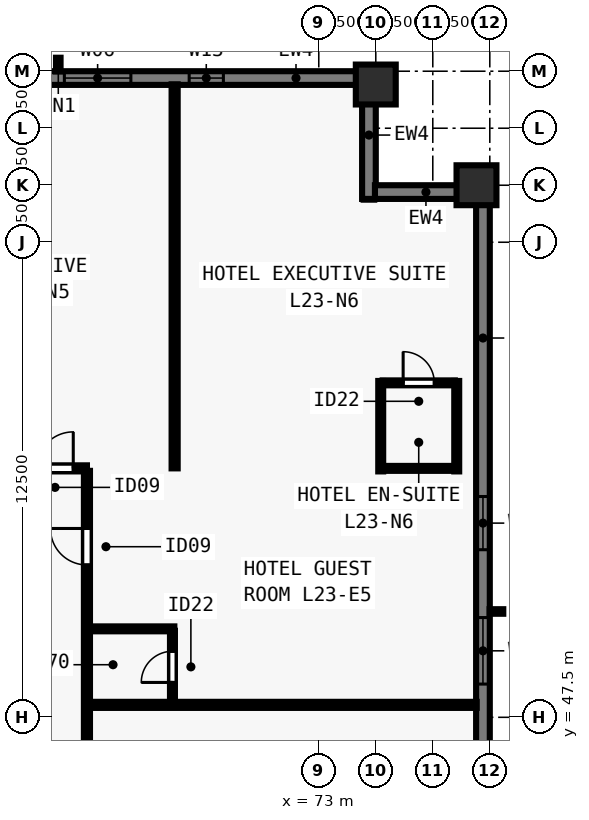
"""IFC4 building model, lengths in metres.
Left out: names, types, materials, properties, quantities, classifications, styles, units other than length and angle.
Written with IfcOpenShell. Run it as: python <this file> out.ifc"""

import sys

from ifc_helpers import new_model, si_unit, direction, frame, frame_2d, origin, origin_2d, place, context, subcontext, project, spatial, rectangle, extrude, element, fill, save


model = new_model("IFC4")
c1 = context("Model", 3, precision=1e-05, world=origin(), true_north=direction((0.0, 1.0)))
c2 = subcontext(c1, "Body", "Model", "MODEL_VIEW")
j1 = project(units=[si_unit("LENGTHUNIT", "METRE"), si_unit("PLANEANGLEUNIT", "RADIAN")], contexts=[c1])
p1 = place(None, origin())
s1 = spatial("IfcSite", under=j1, at=p1, CompositionType="ELEMENT")
p2 = place(p1, origin())
s2 = spatial("IfcBuilding", under=s1, at=p2, CompositionType="ELEMENT")
p3 = place(p2, frame((0.0, 0.0, 86.5)))
s3 = spatial("IfcBuildingStorey", under=s2, at=p3, CompositionType="ELEMENT", Elevation=86.5)
for number, where, z_axis, x_axis in (
    (1, (77.15, 61.5, 0.0), (0.0, 0.0, 1.0), (0.0, 1.0, 0.0)),
    (2, (74.5, 64.15, 0.0), (0.0, 0.0, 1.0), (1.0, 0.0, 0.0)),
):
    element("IfcColumn", number, at=place(p3, frame(where, z_axis=z_axis, x_axis=x_axis)), inside=s3, PredefinedType="COLUMN", context=c2, shape_type="SweptSolid", body=[
        extrude(rectangle(XDim=1.05, YDim=1.05, at=origin_2d()), origin(), (0.0, 0.0, 1.0), 3.5),
    ])
p4 = place(p3, frame((62.8, 64.32, 0.0), z_axis=(0.0, 0.0, 1.0), x_axis=(1.0, 0.0, 0.0)))
e3 = element("IfcWall", 3, at=p4, inside=s3, PredefinedType="SOLIDWALL", context=c2, shape_type="SweptSolid", body=[
    extrude(rectangle(XDim=11.362, YDim=0.36, at=frame_2d((5.681, 0.0))), origin(), (0.0, 0.0, 1.0), 3.28),
])
p5 = place(p4, frame((3.506, 0.0, 0.8)))
e4 = element("IfcOpeningElement", 4, at=p5, cuts=e3, PredefinedType="OPENING", context=c2, shape_type="SweptSolid", body=[
    extrude(rectangle(XDim=1.75, YDim=1.544, at=frame_2d((0.875, 0.772))), frame((0.0, 0.19, 0.0), z_axis=(0.0, -1.0, 0.0), x_axis=(1.0, 0.0, 0.0)), (0.0, 0.0, 1.0), 0.38),
])
p6 = place(p4, frame((6.79, 0.0, 0.8)))
e5 = element("IfcOpeningElement", 5, at=p6, cuts=e3, PredefinedType="OPENING", context=c2, shape_type="SweptSolid", body=[
    extrude(rectangle(XDim=0.9, YDim=1.544, at=frame_2d((0.45, 0.772))), frame((0.0, 0.19, 0.0), z_axis=(0.0, -1.0, 0.0), x_axis=(1.0, 0.0, 0.0)), (0.0, 0.0, 1.0), 0.38),
])
p7 = place(p3, frame((74.32, 64.5, 0.0), z_axis=(0.0, 0.0, 1.0), x_axis=(0.0, -1.0, 0.0)))
e6 = element("IfcWall", 6, at=p7, inside=s3, PredefinedType="SOLIDWALL", context=c2, shape_type="SweptSolid", body=[
    extrude(rectangle(XDim=3.36, YDim=0.36, at=frame_2d((1.68, 0.0))), origin(), (0.0, 0.0, 1.0), 3.28),
])
p8 = place(p3, frame((74.478, 61.32, 0.0), z_axis=(0.0, 0.0, 1.0), x_axis=(1.0, 0.0, 0.0)))
e7 = element("IfcWall", 7, at=p8, inside=s3, PredefinedType="SOLIDWALL", context=c2, shape_type="SweptSolid", body=[
    extrude(rectangle(XDim=2.684, YDim=0.36, at=frame_2d((1.342, 0.0))), origin(), (0.0, 0.0, 1.0), 3.28),
])
p9 = place(p3, frame((77.32, 61.5, 0.0), z_axis=(0.0, 0.0, 1.0), x_axis=(0.0, -1.0, 0.0)))
e8 = element("IfcWall", 8, at=p9, inside=s3, PredefinedType="SOLIDWALL", context=c2, shape_type="SweptSolid", body=[
    extrude(rectangle(XDim=44.662, YDim=0.36, at=frame_2d((22.331, 0.0))), origin(), (0.0, 0.0, 1.0), 3.28),
])
p10 = place(p9, frame((8.19, 0.0, 0.8)))
e9 = element("IfcOpeningElement", 9, at=p10, cuts=e8, PredefinedType="OPENING", context=c2, shape_type="SweptSolid", body=[
    extrude(rectangle(XDim=1.4, YDim=1.544, at=frame_2d((0.7, 0.772))), frame((0.0, 0.19, 0.0), z_axis=(0.0, -1.0, 0.0), x_axis=(1.0, 0.0, 0.0)), (0.0, 0.0, 1.0), 0.38),
])
p11 = place(p9, frame((11.375, 0.0, 0.8)))
e10 = element("IfcOpeningElement", 10, at=p11, cuts=e8, PredefinedType="OPENING", context=c2, shape_type="SweptSolid", body=[
    extrude(rectangle(XDim=1.75, YDim=1.544, at=frame_2d((0.875, 0.772))), frame((0.0, 0.19, 0.0), z_axis=(0.0, -1.0, 0.0), x_axis=(1.0, 0.0, 0.0)), (0.0, 0.0, 1.0), 0.38),
])
p12 = place(p9, frame((14.911, 0.0, 0.8)))
e11 = element("IfcOpeningElement", 11, at=p12, cuts=e8, PredefinedType="OPENING", context=c2, shape_type="SweptSolid", body=[
    extrude(rectangle(XDim=1.4, YDim=1.544, at=frame_2d((0.7, 0.772))), frame((0.0, 0.19, 0.0), z_axis=(0.0, -1.0, 0.0), x_axis=(1.0, 0.0, 0.0)), (0.0, 0.0, 1.0), 0.38),
])
p13 = place(p9, frame((21.631, 0.0, 0.8)))
e12 = element("IfcOpeningElement", 12, at=p13, cuts=e8, PredefinedType="OPENING", context=c2, shape_type="SweptSolid", body=[
    extrude(rectangle(XDim=1.4, YDim=1.544, at=frame_2d((0.7, 0.772))), frame((0.0, 0.19, 0.0), z_axis=(0.0, -1.0, 0.0), x_axis=(1.0, 0.0, 0.0)), (0.0, 0.0, 1.0), 0.38),
])
p14 = place(p9, frame((23.566, 0.0, 0.8)))
e13 = element("IfcOpeningElement", 13, at=p14, cuts=e8, PredefinedType="OPENING", context=c2, shape_type="SweptSolid", body=[
    extrude(rectangle(XDim=1.75, YDim=1.544, at=frame_2d((0.875, 0.772))), frame((0.0, 0.19, 0.0), z_axis=(0.0, -1.0, 0.0), x_axis=(1.0, 0.0, 0.0)), (0.0, 0.0, 1.0), 0.38),
])
p15 = place(p9, frame((28.351, 0.0, 0.8)))
e14 = element("IfcOpeningElement", 14, at=p15, cuts=e8, PredefinedType="OPENING", context=c2, shape_type="SweptSolid", body=[
    extrude(rectangle(XDim=1.4, YDim=1.544, at=frame_2d((0.7, 0.772))), frame((0.0, 0.19, 0.0), z_axis=(0.0, -1.0, 0.0), x_axis=(1.0, 0.0, 0.0)), (0.0, 0.0, 1.0), 0.38),
])
p16 = place(p9, frame((31.987, 0.0, 0.8)))
e15 = element("IfcOpeningElement", 15, at=p16, cuts=e8, PredefinedType="OPENING", context=c2, shape_type="SweptSolid", body=[
    extrude(rectangle(XDim=1.75, YDim=1.544, at=frame_2d((0.875, 0.772))), frame((0.0, 0.19, 0.0), z_axis=(0.0, -1.0, 0.0), x_axis=(1.0, 0.0, 0.0)), (0.0, 0.0, 1.0), 0.38),
])
p17 = place(p9, frame((35.072, 0.0, 0.8)))
e16 = element("IfcOpeningElement", 16, at=p17, cuts=e8, PredefinedType="OPENING", context=c2, shape_type="SweptSolid", body=[
    extrude(rectangle(XDim=1.4, YDim=1.544, at=frame_2d((0.7, 0.772))), frame((0.0, 0.19, 0.0), z_axis=(0.0, -1.0, 0.0), x_axis=(1.0, 0.0, 0.0)), (0.0, 0.0, 1.0), 0.38),
])
p18 = place(p9, frame((38.257, 0.0, 0.8)))
e17 = element("IfcOpeningElement", 17, at=p18, cuts=e8, PredefinedType="OPENING", context=c2, shape_type="SweptSolid", body=[
    extrude(rectangle(XDim=1.75, YDim=1.544, at=frame_2d((0.875, 0.772))), frame((0.0, 0.19, 0.0), z_axis=(0.0, -1.0, 0.0), x_axis=(1.0, 0.0, 0.0)), (0.0, 0.0, 1.0), 0.38),
])
p19 = place(p3, frame((37.1, 54.05, 0.0), z_axis=(0.0, 0.0, 1.0), x_axis=(1.0, 0.0, 0.0)))
e18 = element("IfcWall", 18, at=p19, inside=s3, PredefinedType="PARTITIONING", context=c2, shape_type="SweptSolid", body=[
    extrude(rectangle(XDim=29.8, YDim=0.16, at=frame_2d((14.9, 0.0))), origin(), (0.0, 0.0, 1.0), 3.28),
])
p20 = place(p19, frame((0.91, 0.0, 0.0)))
e19 = element("IfcOpeningElement", 19, at=p20, cuts=e18, PredefinedType="OPENING", context=c2, shape_type="SweptSolid", body=[
    extrude(rectangle(XDim=0.96, YDim=2.15, at=frame_2d((0.48, 1.075))), frame((0.0, 0.09, 0.0), z_axis=(0.0, -1.0, 0.0), x_axis=(1.0, 0.0, 0.0)), (0.0, 0.0, 1.0), 0.18),
])
p21 = place(p19, frame((3.03, 0.0, 0.0)))
e20 = element("IfcOpeningElement", 20, at=p21, cuts=e18, PredefinedType="OPENING", context=c2, shape_type="SweptSolid", body=[
    extrude(rectangle(XDim=0.96, YDim=2.15, at=frame_2d((0.48, 1.075))), frame((0.0, 0.09, 0.0), z_axis=(0.0, -1.0, 0.0), x_axis=(1.0, 0.0, 0.0)), (0.0, 0.0, 1.0), 0.18),
])
p22 = place(p19, frame((11.39, 0.0, 0.0)))
e21 = element("IfcOpeningElement", 21, at=p22, cuts=e18, PredefinedType="OPENING", context=c2, shape_type="SweptSolid", body=[
    extrude(rectangle(XDim=0.96, YDim=2.15, at=frame_2d((0.48, 1.075))), frame((0.0, 0.09, 0.0), z_axis=(0.0, -1.0, 0.0), x_axis=(1.0, 0.0, 0.0)), (0.0, 0.0, 1.0), 0.18),
])
p23 = place(p19, frame((19.75, 0.0, 0.0)))
e22 = element("IfcOpeningElement", 22, at=p23, cuts=e18, PredefinedType="OPENING", context=c2, shape_type="SweptSolid", body=[
    extrude(rectangle(XDim=0.96, YDim=2.15, at=frame_2d((0.48, 1.075))), frame((0.0, 0.09, 0.0), z_axis=(0.0, -1.0, 0.0), x_axis=(1.0, 0.0, 0.0)), (0.0, 0.0, 1.0), 0.18),
])
p24 = place(p19, frame((26.931, 0.0, 0.0)))
e23 = element("IfcOpeningElement", 23, at=p24, cuts=e18, PredefinedType="OPENING", context=c2, shape_type="SweptSolid", body=[
    extrude(rectangle(XDim=0.96, YDim=2.15, at=frame_2d((0.48, 1.075))), frame((0.0, 0.09, 0.0), z_axis=(0.0, -1.0, 0.0), x_axis=(1.0, 0.0, 0.0)), (0.0, 0.0, 1.0), 0.18),
])
p25 = place(p19, frame((28.48, 0.0, 0.0)))
e24 = element("IfcOpeningElement", 24, at=p25, cuts=e18, PredefinedType="OPENING", context=c2, shape_type="SweptSolid", body=[
    extrude(rectangle(XDim=0.96, YDim=2.15, at=frame_2d((0.48, 1.075))), frame((0.0, 0.09, 0.0), z_axis=(0.0, -1.0, 0.0), x_axis=(1.0, 0.0, 0.0)), (0.0, 0.0, 1.0), 0.18),
])
p26 = place(p3, frame((66.9, 24.015, 0.0), z_axis=(0.0, 0.0, 1.0), x_axis=(0.0, 1.0, 0.0)))
e25 = element("IfcWall", 25, at=p26, inside=s3, PredefinedType="PARTITIONING", context=c2, shape_type="SweptSolid", body=[
    extrude(rectangle(XDim=29.97, YDim=0.16, at=frame_2d((14.985, 0.0))), origin(), (0.0, 0.0, 1.0), 3.28),
])
p27 = place(p26, frame((3.911, 0.0, 0.0)))
e26 = element("IfcOpeningElement", 26, at=p27, cuts=e25, PredefinedType="OPENING", context=c2, shape_type="SweptSolid", body=[
    extrude(rectangle(XDim=0.96, YDim=2.15, at=frame_2d((0.48, 1.075))), frame((0.0, 0.09, 0.0), z_axis=(0.0, -1.0, 0.0), x_axis=(1.0, 0.0, 0.0)), (0.0, 0.0, 1.0), 0.18),
])
p28 = place(p26, frame((9.544, 0.0, 0.0)))
e27 = element("IfcOpeningElement", 27, at=p28, cuts=e25, PredefinedType="OPENING", context=c2, shape_type="SweptSolid", body=[
    extrude(rectangle(XDim=0.96, YDim=2.15, at=frame_2d((0.48, 1.075))), frame((0.0, 0.09, 0.0), z_axis=(0.0, -1.0, 0.0), x_axis=(1.0, 0.0, 0.0)), (0.0, 0.0, 1.0), 0.18),
])
p29 = place(p26, frame((15.625, 0.0, 0.0)))
e28 = element("IfcOpeningElement", 28, at=p29, cuts=e25, PredefinedType="OPENING", context=c2, shape_type="SweptSolid", body=[
    extrude(rectangle(XDim=0.96, YDim=2.15, at=frame_2d((0.48, 1.075))), frame((0.0, 0.09, 0.0), z_axis=(0.0, -1.0, 0.0), x_axis=(1.0, 0.0, 0.0)), (0.0, 0.0, 1.0), 0.18),
])
p30 = place(p26, frame((21.584, 0.0, 0.0)))
e29 = element("IfcOpeningElement", 29, at=p30, cuts=e25, PredefinedType="OPENING", context=c2, shape_type="SweptSolid", body=[
    extrude(rectangle(XDim=0.96, YDim=2.15, at=frame_2d((0.48, 1.075))), frame((0.0, 0.09, 0.0), z_axis=(0.0, -1.0, 0.0), x_axis=(1.0, 0.0, 0.0)), (0.0, 0.0, 1.0), 0.18),
])
p31 = place(p26, frame((27.494, 0.0, 0.0)))
e30 = element("IfcOpeningElement", 30, at=p31, cuts=e25, PredefinedType="OPENING", context=c2, shape_type="SweptSolid", body=[
    extrude(rectangle(XDim=0.96, YDim=2.15, at=frame_2d((0.48, 1.075))), frame((0.0, 0.09, 0.0), z_axis=(0.0, -1.0, 0.0), x_axis=(1.0, 0.0, 0.0)), (0.0, 0.0, 1.0), 0.18),
])
p32 = place(p3, frame((69.208, 54.05, 0.0), z_axis=(0.0, 0.0, 1.0), x_axis=(0.0, 1.0, 0.0)))
e31 = element("IfcWall", 31, at=p32, inside=s3, PredefinedType="PARTITIONING", context=c2, shape_type="SweptSolid", body=[
    extrude(rectangle(XDim=10.105, YDim=0.16, at=frame_2d((5.052, 0.0))), origin(), (0.0, 0.0, 1.0), 2.439),
])
for number, where, z_axis, x_axis in (
    (32, (76.63, 53.97, 0.0), (0.0, 0.0, 1.0), (0.0, 1.0, 0.0)),
    (33, (74.63, 53.97, 0.0), (0.0, 0.0, 1.0), (0.0, 1.0, 0.0)),
):
    element("IfcWall", number, at=place(p3, frame(where, z_axis=z_axis, x_axis=x_axis)), inside=s3, PredefinedType="PLUMBINGWALL", context=c2, shape_type="SweptSolid", body=[
        extrude(rectangle(XDim=2.38, YDim=0.13, at=frame_2d((1.19, 0.0))), origin(), (0.0, 0.0, 1.0), 3.28),
    ])
p33 = place(p3, frame((74.68, 56.3, 0.0), z_axis=(0.0, 0.0, 1.0), x_axis=(1.0, 0.0, 0.0)))
e34 = element("IfcWall", 34, at=p33, inside=s3, PredefinedType="PLUMBINGWALL", context=c2, shape_type="SweptSolid", body=[
    extrude(rectangle(XDim=1.9, YDim=0.13, at=frame_2d((0.95, 0.0))), origin(), (0.0, 0.0, 1.0), 3.28),
])
p34 = place(p33, frame((0.54, 0.0, 0.0)))
e35 = element("IfcOpeningElement", 35, at=p34, cuts=e34, PredefinedType="OPENING", context=c2, shape_type="SweptSolid", body=[
    extrude(rectangle(XDim=0.82, YDim=2.1, at=frame_2d((0.41, 1.05))), frame((0.0, 0.075, 0.0), z_axis=(0.0, -1.0, 0.0), x_axis=(1.0, 0.0, 0.0)), (0.0, 0.0, 1.0), 0.15),
])
p35 = place(p3, frame((74.68, 54.05, 0.0), z_axis=(0.0, 0.0, 1.0), x_axis=(1.0, 0.0, 0.0)))
e36 = element("IfcWall", 36, at=p35, inside=s3, PredefinedType="PLUMBINGWALL", context=c2, shape_type="SweptSolid", body=[
    extrude(rectangle(XDim=1.9, YDim=0.13, at=frame_2d((0.95, 0.0))), origin(), (0.0, 0.0, 1.0), 3.28),
])
p36 = place(p3, frame((66.965, 47.827, 0.0), z_axis=(0.0, 0.0, 1.0), x_axis=(1.0, 0.0, 0.0)))
e37 = element("IfcWall", 37, at=p36, inside=s3, PredefinedType="PARTITIONING", context=c2, shape_type="SweptSolid", body=[
    extrude(rectangle(XDim=10.19, YDim=0.16, at=frame_2d((5.095, 0.0))), origin(), (0.0, 0.0, 1.0), 3.28),
])
p37 = place(p3, frame((66.965, 49.827, 0.0), z_axis=(0.0, 0.0, 1.0), x_axis=(1.0, 0.0, 0.0)))
e38 = element("IfcWall", 38, at=p37, inside=s3, PredefinedType="PLUMBINGWALL", context=c2, shape_type="SweptSolid", body=[
    extrude(rectangle(XDim=2.235, YDim=0.13, at=frame_2d((1.117, 0.0))), origin(), (0.0, 0.0, 1.0), 3.28),
])
p38 = place(p3, frame((69.15, 47.893, 0.0), z_axis=(0.0, 0.0, 1.0), x_axis=(0.0, 1.0, 0.0)))
e39 = element("IfcWall", 39, at=p38, inside=s3, PredefinedType="PLUMBINGWALL", context=c2, shape_type="SweptSolid", body=[
    extrude(rectangle(XDim=1.885, YDim=0.13, at=frame_2d((0.942, 0.0))), origin(), (0.0, 0.0, 1.0), 3.28),
])
p39 = place(p38, frame((0.525, 0.0, 0.0)))
e40 = element("IfcOpeningElement", 40, at=p39, cuts=e39, PredefinedType="OPENING", context=c2, shape_type="SweptSolid", body=[
    extrude(rectangle(XDim=0.82, YDim=2.1, at=frame_2d((0.41, 1.05))), frame((0.0, 0.075, 0.0), z_axis=(0.0, -1.0, 0.0), x_axis=(1.0, 0.0, 0.0)), (0.0, 0.0, 1.0), 0.15),
])
p40 = place(p5, origin())
e41 = element("IfcWindow", 41, at=p40, inside=s3, PartitioningType="SINGLE_PANEL", PredefinedType="WINDOW", context=c2, shape_type="SweptSolid", body=[
    extrude(rectangle(XDim=1.75, YDim=1.544, at=frame_2d((0.875, 0.772))), frame((0.0, -0.05, 0.0), z_axis=(0.0, -1.0, 0.0), x_axis=(1.0, 0.0, 0.0)), (0.0, 0.0, 1.0), 0.06),
])
fill(e4, e41)
p41 = place(p10, origin())
e42 = element("IfcWindow", 42, at=p41, inside=s3, PartitioningType="SINGLE_PANEL", PredefinedType="WINDOW", context=c2, shape_type="SweptSolid", body=[
    extrude(rectangle(XDim=1.4, YDim=1.544, at=frame_2d((0.7, 0.772))), frame((0.0, -0.05, 0.0), z_axis=(0.0, -1.0, 0.0), x_axis=(1.0, 0.0, 0.0)), (0.0, 0.0, 1.0), 0.06),
])
fill(e9, e42)
p42 = place(p11, origin())
e43 = element("IfcWindow", 43, at=p42, inside=s3, PartitioningType="SINGLE_PANEL", PredefinedType="WINDOW", context=c2, shape_type="SweptSolid", body=[
    extrude(rectangle(XDim=1.75, YDim=1.544, at=frame_2d((0.875, 0.772))), frame((0.0, -0.05, 0.0), z_axis=(0.0, -1.0, 0.0), x_axis=(1.0, 0.0, 0.0)), (0.0, 0.0, 1.0), 0.06),
])
fill(e10, e43)
p43 = place(p6, origin())
e44 = element("IfcWindow", 44, at=p43, inside=s3, PartitioningType="SINGLE_PANEL", PredefinedType="WINDOW", context=c2, shape_type="SweptSolid", body=[
    extrude(rectangle(XDim=0.9, YDim=1.544, at=frame_2d((0.45, 0.772))), frame((0.0, -0.04, 0.0), z_axis=(0.0, -1.0, 0.0), x_axis=(1.0, 0.0, 0.0)), (0.0, 0.0, 1.0), 0.06),
])
fill(e5, e44)
p44 = place(p34, origin())
e45 = element("IfcDoor", 45, at=p44, inside=s3, OperationType="SINGLE_SWING_LEFT", PredefinedType="DOOR", context=c2, shape_type="SweptSolid", body=[
    extrude(rectangle(XDim=0.82, YDim=2.1, at=frame_2d((0.41, 1.05))), frame((0.0, 0.025, 0.0), z_axis=(0.0, -1.0, 0.0), x_axis=(1.0, 0.0, 0.0)), (0.0, 0.0, 1.0), 0.05),
])
fill(e35, e45)
p45 = place(p25, origin())
e46 = element("IfcDoor", 46, at=p45, inside=s3, OperationType="SINGLE_SWING_RIGHT", PredefinedType="DOOR", context=c2, shape_type="SweptSolid", body=[
    extrude(rectangle(XDim=0.96, YDim=2.15, at=frame_2d((0.48, 1.075))), frame((0.0, 0.025, 0.0), z_axis=(0.0, -1.0, 0.0), x_axis=(1.0, 0.0, 0.0)), (0.0, 0.0, 1.0), 0.05),
])
fill(e24, e46)
p46 = place(p39, origin())
e47 = element("IfcDoor", 47, at=p46, inside=s3, OperationType="SINGLE_SWING_LEFT", PredefinedType="DOOR", context=c2, shape_type="SweptSolid", body=[
    extrude(rectangle(XDim=0.82, YDim=2.1, at=frame_2d((0.41, 1.05))), frame((0.0, 0.025, 0.0), z_axis=(0.0, -1.0, 0.0), x_axis=(1.0, 0.0, 0.0)), (0.0, 0.0, 1.0), 0.05),
])
fill(e40, e47)
p47 = place(p31, origin())
e48 = element("IfcDoor", 48, at=p47, inside=s3, OperationType="SINGLE_SWING_RIGHT", PredefinedType="DOOR", context=c2, shape_type="SweptSolid", body=[
    extrude(rectangle(XDim=0.96, YDim=2.15, at=frame_2d((0.48, 1.075))), frame((0.0, 0.025, 0.0), z_axis=(0.0, -1.0, 0.0), x_axis=(1.0, 0.0, 0.0)), (0.0, 0.0, 1.0), 0.05),
])
fill(e30, e48)
save(model, sys.argv[1])
